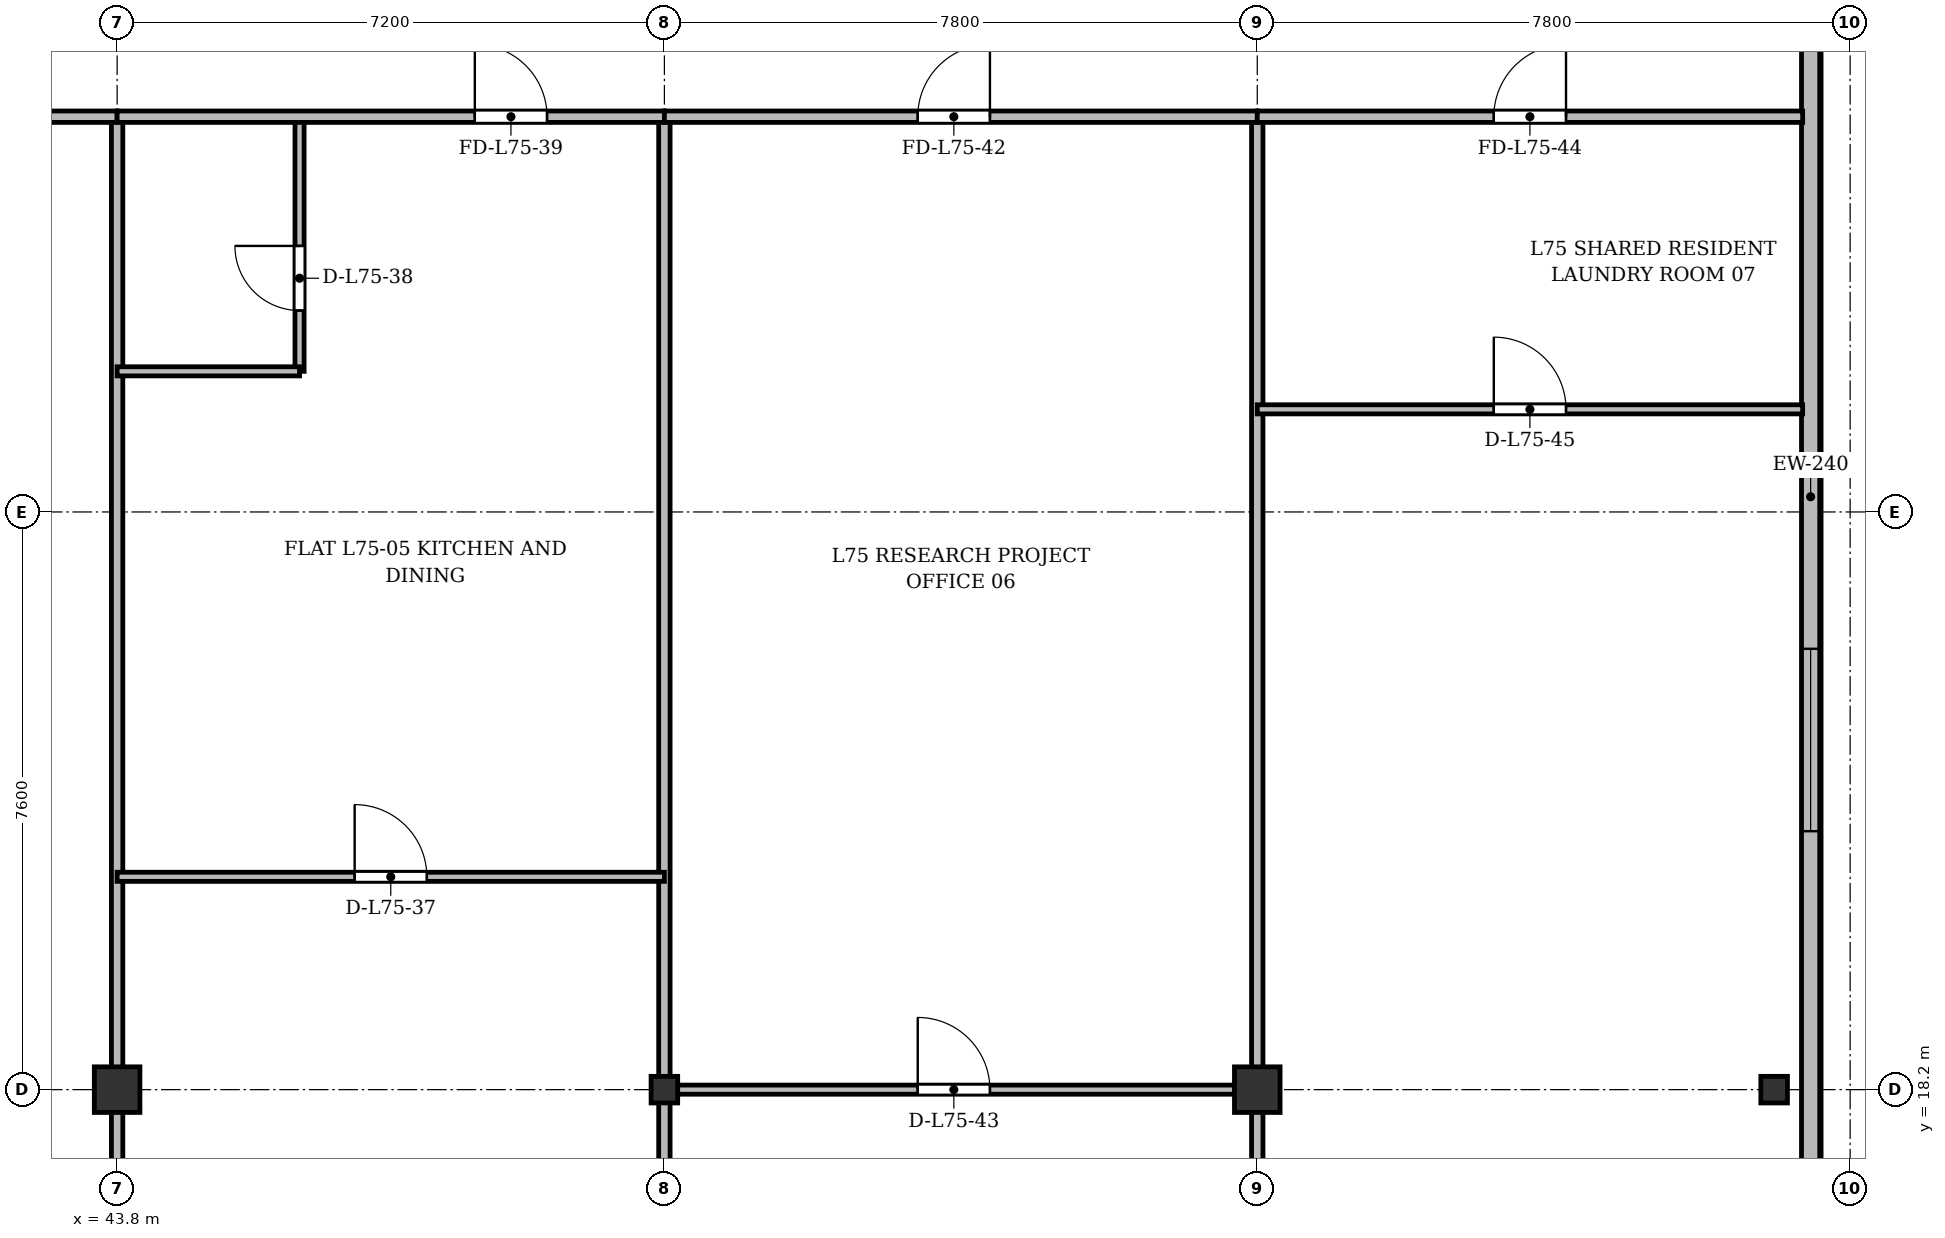
"""IFC4 building model, lengths in metres.
Left out: names, types, materials, properties, quantities, classifications, styles, units other than length and angle.
Written with IfcOpenShell. Run it as: python <this file> out.ifc"""

import sys

from ifc_helpers import new_model, si_unit, direction, frame, frame_2d, origin, origin_2d, place, context, subcontext, project, spatial, rectangle, i_section, extrude, source, transform, mapped, element, fill, save


model = new_model("IFC4")
c1 = context("Model", 3, precision=1e-05, world=origin(), true_north=direction((0.0, 1.0)))
c2 = subcontext(c1, "Body", "Model", "MODEL_VIEW")
j1 = project(units=[si_unit("LENGTHUNIT", "METRE"), si_unit("PLANEANGLEUNIT", "RADIAN")], contexts=[c1])
p1 = place(None, origin())
s1 = spatial("IfcSite", under=j1, at=p1, CompositionType="ELEMENT")
p2 = place(p1, origin())
s2 = spatial("IfcBuilding", under=s1, at=p2, CompositionType="ELEMENT")
p3 = place(p2, frame((0.0, 0.0, 288.3)))
s3 = spatial("IfcBuildingStorey", under=s2, at=p3, CompositionType="ELEMENT", Elevation=288.3)
m1 = source(origin(), c2, "Body", "SweptSolid", [
    extrude(rectangle(XDim=0.6, YDim=0.6, at=origin_2d()), origin(), (0.0, 0.0, 1.0), 3.6),
])
p4 = place(p3, frame((43.8, 18.2, 0.0), z_axis=(0.0, 0.0, 1.0), x_axis=(1.0, 0.0, 0.0)))
e1 = element("IfcColumn", 1, at=p4, inside=s3, PredefinedType="COLUMN", context=c2, shape_type="MappedRepresentation", body=[
    mapped(m1, transform((0.0, 0.0, 0.0), x_axis=(1.0, 0.0, 0.0), y_axis=(0.0, 1.0, 0.0), z_axis=(0.0, 0.0, 1.0), scale=1.0)),
])
m2 = source(origin(), c2, "Body", "SweptSolid", [
    extrude(i_section(OverallWidth=0.35, OverallDepth=0.35, WebThickness=0.018, FlangeThickness=0.028, at=origin_2d()), origin(), (0.0, 0.0, 1.0), 3.6),
])
p5 = place(p3, frame((51.0, 18.2, 0.0), z_axis=(0.0, 0.0, 1.0), x_axis=(1.0, 0.0, 0.0)))
e2 = element("IfcColumn", 2, at=p5, inside=s3, PredefinedType="COLUMN", context=c2, shape_type="MappedRepresentation", body=[
    mapped(m2, transform((0.0, 0.0, 0.0), x_axis=(1.0, 0.0, 0.0), y_axis=(0.0, 1.0, 0.0), z_axis=(0.0, 0.0, 1.0), scale=1.0)),
])
p6 = place(p3, frame((58.8, 18.2, 0.0), z_axis=(0.0, 0.0, 1.0), x_axis=(1.0, 0.0, 0.0)))
e3 = element("IfcColumn", 3, at=p6, inside=s3, PredefinedType="COLUMN", context=c2, shape_type="MappedRepresentation", body=[
    mapped(m1, transform((0.0, 0.0, 0.0), x_axis=(1.0, 0.0, 0.0), y_axis=(0.0, 1.0, 0.0), z_axis=(0.0, 0.0, 1.0), scale=1.0)),
])
p7 = place(p3, frame((65.6, 18.2, 0.0), z_axis=(0.0, 0.0, 1.0), x_axis=(1.0, 0.0, 0.0)))
e4 = element("IfcColumn", 4, at=p7, inside=s3, PredefinedType="COLUMN", context=c2, shape_type="MappedRepresentation", body=[
    mapped(m2, transform((0.0, 0.0, 0.0), x_axis=(1.0, 0.0, 0.0), y_axis=(0.0, 1.0, 0.0), z_axis=(0.0, 0.0, 1.0), scale=1.0)),
])
p8 = place(p3, frame((66.08, 45.5, 0.0), z_axis=(0.0, 0.0, 1.0), x_axis=(0.0, -1.0, 0.0)))
e5 = element("IfcWall", 5, at=p8, inside=s3, PredefinedType="SOLIDWALL", context=c2, shape_type="SweptSolid", body=[
    extrude(rectangle(XDim=39.0, YDim=0.24, at=frame_2d((19.5, 0.0))), origin(), (0.0, 0.0, 1.0), 3.37),
])
p9 = place(p8, frame((36.35, 0.0, 0.92)))
e6 = element("IfcOpeningElement", 6, at=p9, cuts=e5, PredefinedType="OPENING", context=c2, shape_type="SweptSolid", body=[
    extrude(rectangle(XDim=1.2, YDim=1.65, at=frame_2d((0.6, 0.825))), frame((0.0, 0.13, 0.0), z_axis=(0.0, -1.0, 0.0), x_axis=(1.0, 0.0, 0.0)), (0.0, 0.0, 1.0), 0.26),
])
p10 = place(p8, frame((32.9, 0.0, 0.92)))
e7 = element("IfcOpeningElement", 7, at=p10, cuts=e5, PredefinedType="OPENING", context=c2, shape_type="SweptSolid", body=[
    extrude(rectangle(XDim=2.4, YDim=2.1, at=frame_2d((1.2, 1.05))), frame((0.0, 0.13, 0.0), z_axis=(0.0, -1.0, 0.0), x_axis=(1.0, 0.0, 0.0)), (0.0, 0.0, 1.0), 0.26),
])
p11 = place(p8, frame((28.7, 0.0, 0.92)))
e8 = element("IfcOpeningElement", 8, at=p11, cuts=e5, PredefinedType="OPENING", context=c2, shape_type="SweptSolid", body=[
    extrude(rectangle(XDim=2.4, YDim=2.1, at=frame_2d((1.2, 1.05))), frame((0.0, 0.13, 0.0), z_axis=(0.0, -1.0, 0.0), x_axis=(1.0, 0.0, 0.0)), (0.0, 0.0, 1.0), 0.26),
])
p12 = place(p8, frame((21.5, 0.0, 0.92)))
e9 = element("IfcOpeningElement", 9, at=p12, cuts=e5, PredefinedType="OPENING", context=c2, shape_type="SweptSolid", body=[
    extrude(rectangle(XDim=2.4, YDim=2.1, at=frame_2d((1.2, 1.05))), frame((0.0, 0.13, 0.0), z_axis=(0.0, -1.0, 0.0), x_axis=(1.0, 0.0, 0.0)), (0.0, 0.0, 1.0), 0.26),
])
p13 = place(p8, frame((7.5, 0.0, 0.92)))
e10 = element("IfcOpeningElement", 10, at=p13, cuts=e5, PredefinedType="OPENING", context=c2, shape_type="SweptSolid", body=[
    extrude(rectangle(XDim=2.4, YDim=2.1, at=frame_2d((1.2, 1.05))), frame((0.0, 0.13, 0.0), z_axis=(0.0, -1.0, 0.0), x_axis=(1.0, 0.0, 0.0)), (0.0, 0.0, 1.0), 0.26),
])
p14 = place(p8, frame((4.5, 0.0, 0.92)))
e11 = element("IfcOpeningElement", 11, at=p14, cuts=e5, PredefinedType="OPENING", context=c2, shape_type="SweptSolid", body=[
    extrude(rectangle(XDim=1.2, YDim=1.65, at=frame_2d((0.6, 0.825))), frame((0.0, 0.13, 0.0), z_axis=(0.0, -1.0, 0.0), x_axis=(1.0, 0.0, 0.0)), (0.0, 0.0, 1.0), 0.26),
])
p15 = place(p8, frame((1.15, 0.0, 0.92)))
e12 = element("IfcOpeningElement", 12, at=p15, cuts=e5, PredefinedType="OPENING", context=c2, shape_type="SweptSolid", body=[
    extrude(rectangle(XDim=1.2, YDim=1.65, at=frame_2d((0.6, 0.825))), frame((0.0, 0.13, 0.0), z_axis=(0.0, -1.0, 0.0), x_axis=(1.0, 0.0, 0.0)), (0.0, 0.0, 1.0), 0.26),
])
for number, where, z_axis, x_axis in (
    (13, (43.8, 3.725, 0.0), (0.0, 0.0, 1.0), (0.0, 1.0, 0.0)),
    (14, (51.0, 3.725, 0.0), (0.0, 0.0, 1.0), (0.0, 1.0, 0.0)),
    (15, (58.8, 3.725, 0.0), (0.0, 0.0, 1.0), (0.0, 1.0, 0.0)),
):
    element("IfcWall", number, at=place(p3, frame(where, z_axis=z_axis, x_axis=x_axis)), inside=s3, PredefinedType="PARTITIONING", context=c2, shape_type="SweptSolid", body=[
        extrude(rectangle(XDim=27.275, YDim=0.15, at=frame_2d((13.637, 0.0))), origin(), (0.0, 0.0, 1.0), 2.87),
    ])
p16 = place(p3, frame((33.2, 31.0, 0.0), z_axis=(0.0, 0.0, 1.0), x_axis=(1.0, 0.0, 0.0)))
e16 = element("IfcWall", 16, at=p16, inside=s3, PredefinedType="PARTITIONING", context=c2, shape_type="SweptSolid", body=[
    extrude(rectangle(XDim=10.6, YDim=0.15, at=frame_2d((5.3, 0.0))), origin(), (0.0, 0.0, 1.0), 2.87),
])
p17 = place(p16, frame((4.408, 0.0, 0.0)))
e17 = element("IfcOpeningElement", 17, at=p17, cuts=e16, PredefinedType="OPENING", context=c2, shape_type="SweptSolid", body=[
    extrude(rectangle(XDim=1.6, YDim=2.2, at=frame_2d((0.8, 1.1))), frame((0.0, 0.085, 0.0), z_axis=(0.0, -1.0, 0.0), x_axis=(1.0, 0.0, 0.0)), (0.0, 0.0, 1.0), 0.17),
])
p18 = place(p3, frame((43.8, 21.0, 0.0), z_axis=(0.0, 0.0, 1.0), x_axis=(1.0, 0.0, 0.0)))
e18 = element("IfcWall", 18, at=p18, inside=s3, PredefinedType="PARTITIONING", context=c2, shape_type="SweptSolid", body=[
    extrude(rectangle(XDim=7.2, YDim=0.12, at=frame_2d((3.6, 0.0))), origin(), (0.0, 0.0, 1.0), 2.87),
])
p19 = place(p18, frame((3.125, 0.0, 0.0)))
e19 = element("IfcOpeningElement", 19, at=p19, cuts=e18, PredefinedType="OPENING", context=c2, shape_type="SweptSolid", body=[
    extrude(rectangle(XDim=0.95, YDim=2.15, at=frame_2d((0.475, 1.075))), frame((0.0, 0.07, 0.0), z_axis=(0.0, -1.0, 0.0), x_axis=(1.0, 0.0, 0.0)), (0.0, 0.0, 1.0), 0.14),
])
p20 = place(p3, frame((46.2, 27.65, 0.0), z_axis=(0.0, 0.0, 1.0), x_axis=(0.0, 1.0, 0.0)))
e20 = element("IfcWall", 20, at=p20, inside=s3, PredefinedType="PARTITIONING", context=c2, shape_type="SweptSolid", body=[
    extrude(rectangle(XDim=3.35, YDim=0.12, at=frame_2d((1.675, 0.0))), origin(), (0.0, 0.0, 1.0), 3.37),
])
p21 = place(p20, frame((0.8, 0.0, 0.0)))
e21 = element("IfcOpeningElement", 21, at=p21, cuts=e20, PredefinedType="OPENING", context=c2, shape_type="SweptSolid", body=[
    extrude(rectangle(XDim=0.85, YDim=2.1, at=frame_2d((0.425, 1.05))), frame((0.0, 0.07, 0.0), z_axis=(0.0, -1.0, 0.0), x_axis=(1.0, 0.0, 0.0)), (0.0, 0.0, 1.0), 0.14),
])
p22 = place(p3, frame((43.8, 27.65, 0.0), z_axis=(0.0, 0.0, 1.0), x_axis=(1.0, 0.0, 0.0)))
e22 = element("IfcWall", 22, at=p22, inside=s3, PredefinedType="PARTITIONING", context=c2, shape_type="SweptSolid", body=[
    extrude(rectangle(XDim=2.4, YDim=0.12, at=frame_2d((1.2, 0.0))), origin(), (0.0, 0.0, 1.0), 2.87),
])
p23 = place(p3, frame((43.8, 31.0, 0.0), z_axis=(0.0, 0.0, 1.0), x_axis=(1.0, 0.0, 0.0)))
e23 = element("IfcWall", 23, at=p23, inside=s3, PredefinedType="PARTITIONING", context=c2, shape_type="SweptSolid", body=[
    extrude(rectangle(XDim=7.2, YDim=0.15, at=frame_2d((3.6, 0.0))), origin(), (0.0, 0.0, 1.0), 2.87),
])
p24 = place(p23, frame((4.706, 0.0, 0.0)))
e24 = element("IfcOpeningElement", 24, at=p24, cuts=e23, PredefinedType="OPENING", context=c2, shape_type="SweptSolid", body=[
    extrude(rectangle(XDim=0.95, YDim=2.15, at=frame_2d((0.475, 1.075))), frame((0.0, 0.085, 0.0), z_axis=(0.0, -1.0, 0.0), x_axis=(1.0, 0.0, 0.0)), (0.0, 0.0, 1.0), 0.17),
])
p25 = place(p3, frame((51.0, 31.0, 0.0), z_axis=(0.0, 0.0, 1.0), x_axis=(1.0, 0.0, 0.0)))
e25 = element("IfcWall", 25, at=p25, inside=s3, PredefinedType="PARTITIONING", context=c2, shape_type="SweptSolid", body=[
    extrude(rectangle(XDim=7.8, YDim=0.15, at=frame_2d((3.9, 0.0))), origin(), (0.0, 0.0, 1.0), 2.87),
])
p26 = place(p25, frame((3.333, 0.0, 0.0)))
e26 = element("IfcOpeningElement", 26, at=p26, cuts=e25, PredefinedType="OPENING", context=c2, shape_type="SweptSolid", body=[
    extrude(rectangle(XDim=0.95, YDim=2.15, at=frame_2d((0.475, 1.075))), frame((0.0, 0.085, 0.0), z_axis=(0.0, -1.0, 0.0), x_axis=(1.0, 0.0, 0.0)), (0.0, 0.0, 1.0), 0.17),
])
p27 = place(p3, frame((51.0, 18.2, 0.0), z_axis=(0.0, 0.0, 1.0), x_axis=(1.0, 0.0, 0.0)))
e27 = element("IfcWall", 27, at=p27, inside=s3, PredefinedType="PARTITIONING", context=c2, shape_type="SweptSolid", body=[
    extrude(rectangle(XDim=7.8, YDim=0.12, at=frame_2d((3.9, 0.0))), origin(), (0.0, 0.0, 1.0), 2.92),
])
p28 = place(p27, frame((3.333, 0.0, 0.0)))
e28 = element("IfcOpeningElement", 28, at=p28, cuts=e27, PredefinedType="OPENING", context=c2, shape_type="SweptSolid", body=[
    extrude(rectangle(XDim=0.95, YDim=2.15, at=frame_2d((0.475, 1.075))), frame((0.0, 0.07, 0.0), z_axis=(0.0, -1.0, 0.0), x_axis=(1.0, 0.0, 0.0)), (0.0, 0.0, 1.0), 0.14),
])
p29 = place(p3, frame((58.8, 31.0, 0.0), z_axis=(0.0, 0.0, 1.0), x_axis=(1.0, 0.0, 0.0)))
e29 = element("IfcWall", 29, at=p29, inside=s3, PredefinedType="PARTITIONING", context=c2, shape_type="SweptSolid", body=[
    extrude(rectangle(XDim=7.175, YDim=0.15, at=frame_2d((3.587, 0.0))), origin(), (0.0, 0.0, 1.0), 2.87),
])
p30 = place(p29, frame((3.112, 0.0, 0.0)))
e30 = element("IfcOpeningElement", 30, at=p30, cuts=e29, PredefinedType="OPENING", context=c2, shape_type="SweptSolid", body=[
    extrude(rectangle(XDim=0.95, YDim=2.15, at=frame_2d((0.475, 1.075))), frame((0.0, 0.085, 0.0), z_axis=(0.0, -1.0, 0.0), x_axis=(1.0, 0.0, 0.0)), (0.0, 0.0, 1.0), 0.17),
])
p31 = place(p3, frame((58.8, 27.15, 0.0), z_axis=(0.0, 0.0, 1.0), x_axis=(1.0, 0.0, 0.0)))
e31 = element("IfcWall", 31, at=p31, inside=s3, PredefinedType="PARTITIONING", context=c2, shape_type="SweptSolid", body=[
    extrude(rectangle(XDim=7.175, YDim=0.12, at=frame_2d((3.587, 0.0))), origin(), (0.0, 0.0, 1.0), 2.87),
])
p32 = place(p31, frame((3.112, 0.0, 0.0)))
e32 = element("IfcOpeningElement", 32, at=p32, cuts=e31, PredefinedType="OPENING", context=c2, shape_type="SweptSolid", body=[
    extrude(rectangle(XDim=0.95, YDim=2.15, at=frame_2d((0.475, 1.075))), frame((0.0, 0.07, 0.0), z_axis=(0.0, -1.0, 0.0), x_axis=(1.0, 0.0, 0.0)), (0.0, 0.0, 1.0), 0.14),
])
m3 = source(origin(), c2, "Body", "SweptSolid", [
    extrude(rectangle(XDim=2.4, YDim=2.1, at=frame_2d((1.2, 1.05))), frame((0.0, 0.03, 0.0), z_axis=(0.0, -1.0, 0.0), x_axis=(1.0, 0.0, 0.0)), (0.0, 0.0, 1.0), 0.06),
])
p33 = place(p12, origin())
e33 = element("IfcWindow", 33, at=p33, inside=s3, PartitioningType="SINGLE_PANEL", PredefinedType="WINDOW", context=c2, shape_type="MappedRepresentation", body=[
    mapped(m3, transform((0.0, 0.0, 0.0), x_axis=(1.0, 0.0, 0.0), y_axis=(0.0, 1.0, 0.0), z_axis=(0.0, 0.0, 1.0), scale=1.0)),
])
fill(e9, e33)
m4 = source(origin(), c2, "Body", "SweptSolid", [
    extrude(rectangle(XDim=0.95, YDim=2.15, at=frame_2d((0.475, 1.075))), frame((0.0, 0.025, 0.0), z_axis=(0.0, -1.0, 0.0), x_axis=(1.0, 0.0, 0.0)), (0.0, 0.0, 1.0), 0.05),
])
p34 = place(p19, origin())
e34 = element("IfcDoor", 34, at=p34, inside=s3, OperationType="SINGLE_SWING_LEFT", PredefinedType="DOOR", context=c2, shape_type="MappedRepresentation", body=[
    mapped(m4, transform((0.0, 0.0, 0.0), x_axis=(1.0, 0.0, 0.0), y_axis=(0.0, 1.0, 0.0), z_axis=(0.0, 0.0, 1.0), scale=1.0)),
])
fill(e19, e34)
m5 = source(origin(), c2, "Body", "SweptSolid", [
    extrude(rectangle(XDim=0.85, YDim=2.1, at=frame_2d((0.425, 1.05))), frame((0.0, 0.025, 0.0), z_axis=(0.0, -1.0, 0.0), x_axis=(1.0, 0.0, 0.0)), (0.0, 0.0, 1.0), 0.05),
])
p35 = place(p21, origin())
e35 = element("IfcDoor", 35, at=p35, inside=s3, OperationType="SINGLE_SWING_RIGHT", PredefinedType="DOOR", context=c2, shape_type="MappedRepresentation", body=[
    mapped(m5, transform((0.0, 0.0, 0.0), x_axis=(1.0, 0.0, 0.0), y_axis=(0.0, 1.0, 0.0), z_axis=(0.0, 0.0, 1.0), scale=1.0)),
])
fill(e21, e35)
p36 = place(p24, origin())
e36 = element("IfcDoor", 36, at=p36, inside=s3, OperationType="SINGLE_SWING_LEFT", PredefinedType="DOOR", context=c2, shape_type="MappedRepresentation", body=[
    mapped(m4, transform((0.0, 0.0, 0.0), x_axis=(1.0, 0.0, 0.0), y_axis=(0.0, 1.0, 0.0), z_axis=(0.0, 0.0, 1.0), scale=1.0)),
])
fill(e24, e36)
p37 = place(p26, origin())
e37 = element("IfcDoor", 37, at=p37, inside=s3, OperationType="SINGLE_SWING_RIGHT", PredefinedType="DOOR", context=c2, shape_type="MappedRepresentation", body=[
    mapped(m4, transform((0.0, 0.0, 0.0), x_axis=(1.0, 0.0, 0.0), y_axis=(0.0, 1.0, 0.0), z_axis=(0.0, 0.0, 1.0), scale=1.0)),
])
fill(e26, e37)
p38 = place(p28, origin())
e38 = element("IfcDoor", 38, at=p38, inside=s3, OperationType="SINGLE_SWING_LEFT", PredefinedType="DOOR", context=c2, shape_type="MappedRepresentation", body=[
    mapped(m4, transform((0.0, 0.0, 0.0), x_axis=(1.0, 0.0, 0.0), y_axis=(0.0, 1.0, 0.0), z_axis=(0.0, 0.0, 1.0), scale=1.0)),
])
fill(e28, e38)
p39 = place(p30, origin())
e39 = element("IfcDoor", 39, at=p39, inside=s3, OperationType="SINGLE_SWING_RIGHT", PredefinedType="DOOR", context=c2, shape_type="MappedRepresentation", body=[
    mapped(m4, transform((0.0, 0.0, 0.0), x_axis=(1.0, 0.0, 0.0), y_axis=(0.0, 1.0, 0.0), z_axis=(0.0, 0.0, 1.0), scale=1.0)),
])
fill(e30, e39)
p40 = place(p32, origin())
e40 = element("IfcDoor", 40, at=p40, inside=s3, OperationType="SINGLE_SWING_LEFT", PredefinedType="DOOR", context=c2, shape_type="MappedRepresentation", body=[
    mapped(m4, transform((0.0, 0.0, 0.0), x_axis=(1.0, 0.0, 0.0), y_axis=(0.0, 1.0, 0.0), z_axis=(0.0, 0.0, 1.0), scale=1.0)),
])
fill(e32, e40)
save(model, sys.argv[1])
